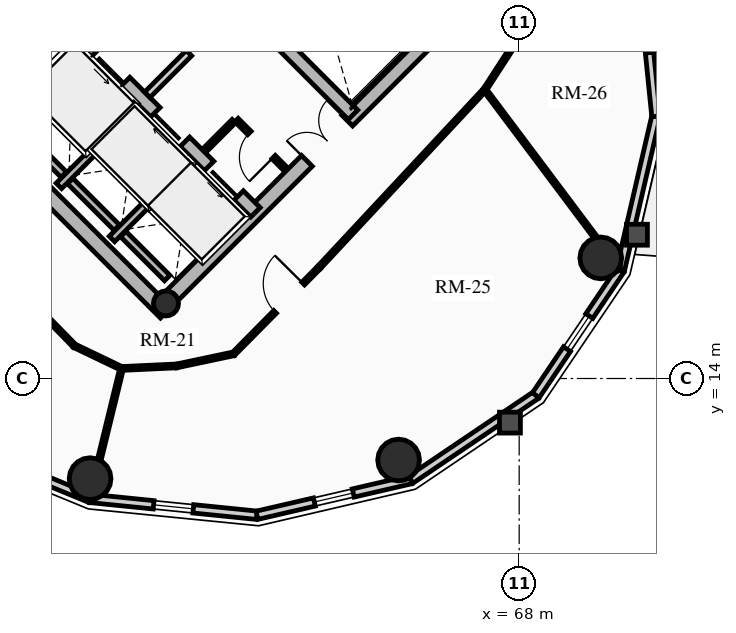
"""IFC4 building model, lengths in metres.
Left out: names, types, materials, properties, quantities, classifications, styles, units other than length and angle.
Written with IfcOpenShell. Run it as: python <this file> out.ifc"""

import sys

from ifc_helpers import new_model, si_unit, direction, frame, frame_2d, origin, origin_2d, place, context, subcontext, project, spatial, rectangle, circle, hollow_circle, extrude, source, transform, mapped, element, fill, save


model = new_model("IFC4")
c1 = context("Model", 3, precision=1e-05, world=origin(), true_north=direction((0.0, 1.0)))
c2 = subcontext(c1, "Body", "Model", "MODEL_VIEW")
j1 = project(units=[si_unit("LENGTHUNIT", "METRE"), si_unit("PLANEANGLEUNIT", "RADIAN")], contexts=[c1])
p1 = place(None, origin())
s1 = spatial("IfcSite", under=j1, at=p1, CompositionType="ELEMENT")
p2 = place(p1, origin())
s2 = spatial("IfcBuilding", under=s1, at=p2, CompositionType="ELEMENT")
p3 = place(p2, frame((0.0, 0.0, 199.57)))
s3 = spatial("IfcBuildingStorey", under=s2, at=p3, CompositionType="ELEMENT", Elevation=199.57)
p4 = place(p3, frame((58.702, 15.732, 0.0), z_axis=(0.0, 0.0, 1.0), x_axis=(-0.707106781187, 0.707106781187, 0.0)))
e1 = element("IfcWall", 1, at=p4, inside=s3, PredefinedType="SHEAR", context=c2, shape_type="SweptSolid", body=[
    extrude(rectangle(XDim=14.1, YDim=0.4, at=frame_2d((7.05, 0.0))), origin(), (0.0, 0.0, 1.0), 2.91),
])
p5 = place(p3, frame((58.561, 15.873, 0.0), z_axis=(0.0, 0.0, 1.0), x_axis=(0.707106781187, 0.707106781187, 0.0)))
e2 = element("IfcWall", 2, at=p5, inside=s3, PredefinedType="SHEAR", context=c2, shape_type="SweptSolid", body=[
    extrude(rectangle(XDim=10.7, YDim=0.4, at=frame_2d((5.35, 0.0))), origin(), (0.0, 0.0, 1.0), 2.91),
])
m1 = source(origin(), c2, "Body", "SweptSolid", [
    extrude(rectangle(XDim=1.5, YDim=2.02, at=frame_2d((0.75, 1.01))), frame((0.0, 0.21, 0.0), z_axis=(0.0, -1.0, 0.0), x_axis=(1.0, 0.0, 0.0)), (0.0, 0.0, 1.0), 0.42),
])
p6 = place(p5, frame((5.45, 0.0, 0.0)))
e3 = element("IfcOpeningElement", 3, at=p6, cuts=e2, PredefinedType="OPENING", context=c2, shape_type="MappedRepresentation", body=[
    mapped(m1, transform((0.0, 0.0, 0.0), x_axis=(1.0, 0.0, 0.0), y_axis=(0.0, 1.0, 0.0), z_axis=(0.0, 0.0, 1.0), scale=1.0)),
])
p7 = place(p3, frame((61.06, 18.373, 0.0), z_axis=(0.0, 0.0, 1.0), x_axis=(-0.707106781187, 0.707106781187, 0.0)))
e4 = element("IfcWall", 4, at=p7, inside=s3, PredefinedType="SHEAR", context=c2, shape_type="SweptSolid", body=[
    extrude(rectangle(XDim=13.7, YDim=0.35, at=frame_2d((6.85, 0.0))), origin(), (0.0, 0.0, 1.0), 2.91),
])
m2 = source(origin(), c2, "Body", "SweptSolid", [
    extrude(rectangle(XDim=1.1, YDim=2.015, at=frame_2d((0.55, 1.007))), frame((0.0, 0.185, 0.0), z_axis=(0.0, -1.0, 0.0), x_axis=(1.0, 0.0, 0.0)), (0.0, 0.0, 1.0), 0.37),
])
p8 = place(p7, frame((4.85, 0.0, 0.0)))
e5 = element("IfcOpeningElement", 5, at=p8, cuts=e4, PredefinedType="OPENING", context=c2, shape_type="MappedRepresentation", body=[
    mapped(m2, transform((0.0, 0.0, 0.0), x_axis=(1.0, 0.0, 0.0), y_axis=(0.0, 1.0, 0.0), z_axis=(0.0, 0.0, 1.0), scale=1.0)),
])
p9 = place(p7, frame((0.625, 0.0, 0.0)))
e6 = element("IfcOpeningElement", 6, at=p9, cuts=e4, PredefinedType="OPENING", context=c2, shape_type="MappedRepresentation", body=[
    mapped(m2, transform((0.0, 0.0, 0.0), x_axis=(1.0, 0.0, 0.0), y_axis=(0.0, 1.0, 0.0), z_axis=(0.0, 0.0, 1.0), scale=1.0)),
])
p10 = place(p7, frame((2.625, 0.0, 0.0)))
e7 = element("IfcOpeningElement", 7, at=p10, cuts=e4, PredefinedType="OPENING", context=c2, shape_type="MappedRepresentation", body=[
    mapped(m2, transform((0.0, 0.0, 0.0), x_axis=(1.0, 0.0, 0.0), y_axis=(0.0, 1.0, 0.0), z_axis=(0.0, 0.0, 1.0), scale=1.0)),
])
m3 = source(origin(), c2, "Body", "SweptSolid", [
    extrude(rectangle(XDim=1.15, YDim=2.02, at=frame_2d((0.575, 1.01))), frame((0.0, 0.185, 0.0), z_axis=(0.0, -1.0, 0.0), x_axis=(1.0, 0.0, 0.0)), (0.0, 0.0, 1.0), 0.37),
])
p11 = place(p7, frame((7.27, 0.0, 0.0)))
e8 = element("IfcOpeningElement", 8, at=p11, cuts=e4, PredefinedType="OPENING", context=c2, shape_type="MappedRepresentation", body=[
    mapped(m3, transform((0.0, 0.0, 0.0), x_axis=(1.0, 0.0, 0.0), y_axis=(0.0, 1.0, 0.0), z_axis=(0.0, 0.0, 1.0), scale=1.0)),
])
p12 = place(p3, frame((63.627, 20.94, 0.0), z_axis=(0.0, 0.0, 1.0), x_axis=(-0.707119496762, 0.707094065383, 0.0)))
e9 = element("IfcWall", 9, at=p12, inside=s3, PredefinedType="SHEAR", context=c2, shape_type="SweptSolid", body=[
    extrude(rectangle(XDim=9.6, YDim=0.35, at=frame_2d((4.8, 0.0))), origin(), (0.0, 0.0, 1.0), 2.91),
])
p13 = place(p12, frame((5.28, 0.0, 0.0)))
e10 = element("IfcOpeningElement", 10, at=p13, cuts=e9, PredefinedType="OPENING", context=c2, shape_type="MappedRepresentation", body=[
    mapped(m3, transform((0.0, 0.0, 0.0), x_axis=(1.0, 0.0, 0.0), y_axis=(0.0, 1.0, 0.0), z_axis=(0.0, 0.0, 1.0), scale=1.0)),
])
p14 = place(p3, frame((53.784, 21.003, 0.0), z_axis=(0.0, 0.0, 1.0), x_axis=(0.707106781187, 0.707106781187, 0.0)))
e11 = element("IfcWall", 11, at=p14, inside=s3, PredefinedType="SHEAR", context=c2, shape_type="SweptSolid", body=[
    extrude(rectangle(XDim=3.285, YDim=0.35, at=frame_2d((1.643, 0.0))), origin(), (0.0, 0.0, 1.0), 2.91),
])
p15 = place(p3, frame((58.706, 15.976, 0.0), z_axis=(0.0, 0.0, 1.0), x_axis=(0.707106781187, 0.707106781187, 0.0)))
e12 = element("IfcColumn", 12, at=p15, inside=s3, PredefinedType="COLUMN", context=c2, shape_type="SweptSolid", body=[
    extrude(hollow_circle(Radius=0.33, WallThickness=0.025, at=origin_2d()), origin(), (0.0, 0.0, 1.0), 2.91),
])
for number, where, z_axis, x_axis in (
    (13, (56.709, 11.365, 0.0), (0.0, 0.0, 1.0), (1.0, 0.0, 0.0)),
    (14, (64.827, 11.854, 0.0), (0.0, 0.0, 1.0), (1.0, 0.0, 0.0)),
    (15, (70.146, 17.173, 0.0), (0.0, 0.0, 1.0), (1.0, 0.0, 0.0)),
):
    element("IfcColumn", number, at=place(p3, frame(where, z_axis=z_axis, x_axis=x_axis)), inside=s3, PredefinedType="USERDEFINED", context=c2, shape_type="SweptSolid", body=[
        extrude(circle(Radius=0.55, at=origin_2d()), origin(), (0.0, 0.0, 1.0), 2.91),
    ])
p16 = place(p3, frame((56.705, 10.845, 0.0), z_axis=(0.0, 0.0, 1.0), x_axis=(-0.924447353237, 0.381309704956, 0.0)))
e16 = element("IfcWall", 16, at=p16, inside=s3, PredefinedType="SOLIDWALL", context=c2, shape_type="SweptSolid", body=[
    extrude(rectangle(XDim=4.671, YDim=0.22, at=frame_2d((2.335, 0.0))), origin(), (0.0, 0.0, 1.0), 2.322),
])
p17 = place(p3, frame((61.1, 10.401, 0.0), z_axis=(0.0, 0.0, 1.0), x_axis=(-0.994929930991, 0.100570534541, 0.0)))
e17 = element("IfcWall", 17, at=p17, inside=s3, PredefinedType="SOLIDWALL", context=c2, shape_type="SweptSolid", body=[
    extrude(rectangle(XDim=4.418, YDim=0.22, at=frame_2d((2.209, 0.0))), origin(), (0.0, 0.0, 1.0), 2.322),
])
m4 = source(origin(), c2, "Body", "SweptSolid", [
    extrude(rectangle(XDim=1.05, YDim=1.3, at=frame_2d((0.525, 0.65))), frame((0.0, 0.12, 0.0), z_axis=(0.0, -1.0, 0.0), x_axis=(1.0, 0.0, 0.0)), (0.0, 0.0, 1.0), 0.24),
])
p18 = place(p17, frame((1.684, 0.0, 0.65)))
e18 = element("IfcOpeningElement", 18, at=p18, cuts=e17, PredefinedType="OPENING", context=c2, shape_type="MappedRepresentation", body=[
    mapped(m4, transform((0.0, 0.0, 0.0), x_axis=(1.0, 0.0, 0.0), y_axis=(0.0, 1.0, 0.0), z_axis=(0.0, 0.0, 1.0), scale=1.0)),
])
p19 = place(p3, frame((65.144, 11.337, 0.0), z_axis=(0.0, 0.0, 1.0), x_axis=(-0.974249228678, -0.225473813158, 0.0)))
e19 = element("IfcWall", 19, at=p19, inside=s3, PredefinedType="SOLIDWALL", context=c2, shape_type="SweptSolid", body=[
    extrude(rectangle(XDim=4.15, YDim=0.22, at=frame_2d((2.075, 0.0))), origin(), (0.0, 0.0, 1.0), 2.322),
])
p20 = place(p19, frame((1.55, 0.0, 0.65)))
e20 = element("IfcOpeningElement", 20, at=p20, cuts=e19, PredefinedType="OPENING", context=c2, shape_type="MappedRepresentation", body=[
    mapped(m4, transform((0.0, 0.0, 0.0), x_axis=(1.0, 0.0, 0.0), y_axis=(0.0, 1.0, 0.0), z_axis=(0.0, 0.0, 1.0), scale=1.0)),
])
p21 = place(p3, frame((68.439, 13.561, 0.0), z_axis=(0.0, 0.0, 1.0), x_axis=(-0.828833723692, -0.559495003079, 0.0)))
e21 = element("IfcWall", 21, at=p21, inside=s3, PredefinedType="SOLIDWALL", context=c2, shape_type="SweptSolid", body=[
    extrude(rectangle(XDim=3.976, YDim=0.22, at=frame_2d((1.988, 0.0))), origin(), (0.0, 0.0, 1.0), 2.322),
])
p22 = place(p3, frame((70.663, 16.856, 0.0), z_axis=(0.0, 0.0, 1.0), x_axis=(-0.559495003079, -0.828833723692, 0.0)))
e22 = element("IfcWall", 22, at=p22, inside=s3, PredefinedType="SOLIDWALL", context=c2, shape_type="SweptSolid", body=[
    extrude(rectangle(XDim=3.976, YDim=0.22, at=frame_2d((1.988, 0.0))), origin(), (0.0, 0.0, 1.0), 2.322),
])
p23 = place(p22, frame((1.463, 0.0, 0.65)))
e23 = element("IfcOpeningElement", 23, at=p23, cuts=e22, PredefinedType="OPENING", context=c2, shape_type="MappedRepresentation", body=[
    mapped(m4, transform((0.0, 0.0, 0.0), x_axis=(1.0, 0.0, 0.0), y_axis=(0.0, 1.0, 0.0), z_axis=(0.0, 0.0, 1.0), scale=1.0)),
])
p24 = place(p3, frame((71.599, 20.9, 0.0), z_axis=(0.0, 0.0, 1.0), x_axis=(-0.225473813158, -0.974249228678, 0.0)))
e24 = element("IfcWall", 24, at=p24, inside=s3, PredefinedType="SOLIDWALL", context=c2, shape_type="SweptSolid", body=[
    extrude(rectangle(XDim=4.15, YDim=0.22, at=frame_2d((2.075, 0.0))), origin(), (0.0, 0.0, 1.0), 2.322),
])
p25 = place(p3, frame((71.155, 25.295, 0.0), z_axis=(0.0, 0.0, 1.0), x_axis=(0.100570534541, -0.994929930991, 0.0)))
e25 = element("IfcWall", 25, at=p25, inside=s3, PredefinedType="SOLIDWALL", context=c2, shape_type="SweptSolid", body=[
    extrude(rectangle(XDim=4.418, YDim=0.22, at=frame_2d((2.209, 0.0))), origin(), (0.0, 0.0, 1.0), 2.322),
])
p26 = place(p25, frame((1.684, 0.0, 0.65)))
e26 = element("IfcOpeningElement", 26, at=p26, cuts=e25, PredefinedType="OPENING", context=c2, shape_type="MappedRepresentation", body=[
    mapped(m4, transform((0.0, 0.0, 0.0), x_axis=(1.0, 0.0, 0.0), y_axis=(0.0, 1.0, 0.0), z_axis=(0.0, 0.0, 1.0), scale=1.0)),
])
p27 = place(p3, frame((55.888, 19.069, 0.0), z_axis=(0.0, 0.0, 1.0), x_axis=(0.707106781187, 0.707106781187, 0.0)))
e27 = element("IfcWall", 27, at=p27, inside=s3, PredefinedType="SHEAR", context=c2, shape_type="SweptSolid", body=[
    extrude(rectangle(XDim=2.97, YDim=0.2, at=frame_2d((1.485, 0.0))), origin(), (0.0, 0.0, 1.0), 2.91),
])
p28 = place(p3, frame((56.015, 19.366, 0.0), z_axis=(0.0, 0.0, 1.0), x_axis=(-0.707106781187, 0.707106781187, 0.0)))
e28 = element("IfcWall", 28, at=p28, inside=s3, PredefinedType="SHEAR", context=c2, shape_type="SweptSolid", body=[
    extrude(rectangle(XDim=2.44, YDim=0.2, at=frame_2d((1.22, 0.0))), origin(), (0.0, 0.0, 1.0), 2.91),
])
p29 = place(p3, frame((57.284, 17.673, 0.0), z_axis=(0.0, 0.0, 1.0), x_axis=(0.707147878904, 0.70706568108, 0.0)))
e29 = element("IfcWall", 29, at=p29, inside=s3, PredefinedType="SHEAR", context=c2, shape_type="SweptSolid", body=[
    extrude(rectangle(XDim=2.97, YDim=0.2, at=frame_2d((1.485, 0.0))), origin(), (0.0, 0.0, 1.0), 2.91),
])
p30 = place(p3, frame((57.412, 17.97, 0.0), z_axis=(0.0, 0.0, 1.0), x_axis=(-0.707106781187, 0.707106781187, 0.0)))
e30 = element("IfcWall", 30, at=p30, inside=s3, PredefinedType="SHEAR", context=c2, shape_type="SweptSolid", body=[
    extrude(rectangle(XDim=1.735, YDim=0.2, at=frame_2d((0.867, 0.0))), origin(), (0.0, 0.0, 1.0), 2.91),
])
p31 = place(p3, frame((58.737, 16.644, 0.0), z_axis=(0.0, 0.0, 1.0), x_axis=(-0.707032117043, 0.707181437447, 0.0)))
e31 = element("IfcWall", 31, at=p31, inside=s3, PredefinedType="SHEAR", context=c2, shape_type="SweptSolid", body=[
    extrude(rectangle(XDim=1.635, YDim=0.2, at=frame_2d((0.817, 0.0))), origin(), (0.0, 0.0, 1.0), 2.91),
])
p32 = place(p3, frame((58.214, 21.467, 0.0), z_axis=(0.0, 0.0, 1.0), x_axis=(0.707106781187, 0.707106781187, 0.0)))
e32 = element("IfcWall", 32, at=p32, inside=s3, PredefinedType="PARTITIONING", context=c2, shape_type="SweptSolid", body=[
    extrude(rectangle(XDim=3.28, YDim=0.2, at=frame_2d((1.64, 0.0))), origin(), (0.0, 0.0, 1.0), 2.685),
])
m5 = source(origin(), c2, "Body", "SweptSolid", [
    extrude(rectangle(XDim=1.5, YDim=2.02, at=frame_2d((0.75, 1.01))), frame((0.0, 0.11, 0.0), z_axis=(0.0, -1.0, 0.0), x_axis=(1.0, 0.0, 0.0)), (0.0, 0.0, 1.0), 0.22),
])
p33 = place(p32, frame((1.55, 0.0, 0.0)))
e33 = element("IfcOpeningElement", 33, at=p33, cuts=e32, PredefinedType="OPENING", context=c2, shape_type="MappedRepresentation", body=[
    mapped(m5, transform((0.0, 0.0, 0.0), x_axis=(1.0, 0.0, 0.0), y_axis=(0.0, 1.0, 0.0), z_axis=(0.0, 0.0, 1.0), scale=1.0)),
])
p34 = place(p3, frame((61.835, 19.529, 0.0), z_axis=(0.0, 0.0, 1.0), x_axis=(-0.707174592913, 0.707038962956, 0.0)))
e34 = element("IfcWall", 34, at=p34, inside=s3, PredefinedType="PARTITIONING", context=c2, shape_type="SweptSolid", body=[
    extrude(rectangle(XDim=1.8, YDim=0.125, at=frame_2d((0.9, 0.0))), origin(), (0.0, 0.0, 1.0), 2.685),
])
m6 = source(origin(), c2, "Body", "SweptSolid", [
    extrude(rectangle(XDim=0.9, YDim=2.005, at=frame_2d((0.45, 1.002))), frame((0.0, 0.073, 0.0), z_axis=(0.0, -1.0, 0.0), x_axis=(1.0, 0.0, 0.0)), (0.0, 0.0, 1.0), 0.145),
])
p35 = place(p34, frame((0.42, 0.0, 0.0)))
e35 = element("IfcOpeningElement", 35, at=p35, cuts=e34, PredefinedType="OPENING", context=c2, shape_type="MappedRepresentation", body=[
    mapped(m6, transform((0.0, 0.0, 0.0), x_axis=(1.0, 0.0, 0.0), y_axis=(0.0, 1.0, 0.0), z_axis=(0.0, 0.0, 1.0), scale=1.0)),
])
p36 = place(p3, frame((59.713, 19.996, 0.0), z_axis=(0.0, 0.0, 1.0), x_axis=(0.707217726, 0.706995818963, 0.0)))
e36 = element("IfcWall", 36, at=p36, inside=s3, PredefinedType="PARTITIONING", context=c2, shape_type="SweptSolid", body=[
    extrude(rectangle(XDim=1.1, YDim=0.125, at=frame_2d((0.55, 0.0))), origin(), (0.0, 0.0, 1.0), 2.685),
])
p37 = place(p3, frame((52.126, 19.126, 0.0), z_axis=(0.0, 0.0, 1.0), x_axis=(0.698979087027, -0.715142108884, 0.0)))
e37 = element("IfcWall", 37, at=p37, inside=s3, PredefinedType="MOVABLE", context=c2, shape_type="SweptSolid", body=[
    extrude(rectangle(XDim=5.966, YDim=0.1, at=frame_2d((2.983, 0.0))), origin(), (0.0, 0.0, 1.0), 2.322),
])
p38 = place(p3, frame((56.296, 14.859, 0.0), z_axis=(0.0, 0.0, 1.0), x_axis=(0.90178292445, -0.432189260823, 0.0)))
e38 = element("IfcWall", 38, at=p38, inside=s3, PredefinedType="MOVABLE", context=c2, shape_type="SweptSolid", body=[
    extrude(rectangle(XDim=1.377, YDim=0.1, at=frame_2d((0.688, 0.0))), origin(), (0.0, 0.0, 1.0), 2.255),
])
p39 = place(p3, frame((57.538, 14.264, 0.0), z_axis=(0.0, 0.0, 1.0), x_axis=(0.99892990172, 0.046249880546, 0.0)))
e39 = element("IfcWall", 39, at=p39, inside=s3, PredefinedType="MOVABLE", context=c2, shape_type="SweptSolid", body=[
    extrude(rectangle(XDim=1.446, YDim=0.1, at=frame_2d((0.723, 0.0))), origin(), (0.0, 0.0, 1.0), 2.322),
])
p40 = place(p3, frame((58.983, 14.331, 0.0), z_axis=(0.0, 0.0, 1.0), x_axis=(0.978328007546, 0.207061125397, 0.0)))
e40 = element("IfcWall", 40, at=p40, inside=s3, PredefinedType="MOVABLE", context=c2, shape_type="SweptSolid", body=[
    extrude(rectangle(XDim=1.534, YDim=0.1, at=frame_2d((0.767, 0.0))), origin(), (0.0, 0.0, 1.0), 2.255),
])
p41 = place(p3, frame((60.484, 14.648, 0.0), z_axis=(0.0, 0.0, 1.0), x_axis=(0.703398221944, 0.710795991383, 0.0)))
e41 = element("IfcWall", 41, at=p41, inside=s3, PredefinedType="MOVABLE", context=c2, shape_type="SweptSolid", body=[
    extrude(rectangle(XDim=3.201, YDim=0.1, at=frame_2d((1.601, 0.0))), origin(), (0.0, 0.0, 1.0), 2.322),
])
m7 = source(origin(), c2, "Body", "SweptSolid", [
    extrude(rectangle(XDim=1.05, YDim=2.015, at=frame_2d((0.525, 1.007))), frame((0.0, 0.06, 0.0), z_axis=(0.0, -1.0, 0.0), x_axis=(1.0, 0.0, 0.0)), (0.0, 0.0, 1.0), 0.12),
])
p42 = place(p41, frame((1.553, 0.0, 0.0)))
e42 = element("IfcOpeningElement", 42, at=p42, cuts=e41, PredefinedType="OPENING", context=c2, shape_type="MappedRepresentation", body=[
    mapped(m7, transform((0.0, 0.0, 0.0), x_axis=(1.0, 0.0, 0.0), y_axis=(0.0, 1.0, 0.0), z_axis=(0.0, 0.0, 1.0), scale=1.0)),
])
p43 = place(p3, frame((62.736, 16.924, 0.0), z_axis=(0.0, 0.0, 1.0), x_axis=(0.681946700833, 0.731401871219, 0.0)))
e43 = element("IfcWall", 43, at=p43, inside=s3, PredefinedType="MOVABLE", context=c2, shape_type="SweptSolid", body=[
    extrude(rectangle(XDim=6.393, YDim=0.1, at=frame_2d((3.196, 0.0))), origin(), (0.0, 0.0, 1.0), 2.255),
])
p44 = place(p3, frame((67.095, 21.6, 0.0), z_axis=(0.0, 0.0, 1.0), x_axis=(0.543773190184, 0.839232219137, 0.0)))
e44 = element("IfcWall", 44, at=p44, inside=s3, PredefinedType="MOVABLE", context=c2, shape_type="SweptSolid", body=[
    extrude(rectangle(XDim=1.823, YDim=0.1, at=frame_2d((0.911, 0.0))), origin(), (0.0, 0.0, 1.0), 2.255),
])
p45 = place(p3, frame((57.538, 14.264, 0.0), z_axis=(0.0, 0.0, 1.0), x_axis=(-0.237377006249, -0.971417601706, 0.0)))
e45 = element("IfcWall", 45, at=p45, inside=s3, PredefinedType="MOVABLE", context=c2, shape_type="SweptSolid", body=[
    extrude(rectangle(XDim=3.499, YDim=0.1, at=frame_2d((1.75, 0.0))), origin(), (0.0, 0.0, 1.0), 2.322),
])
p46 = place(p3, frame((67.095, 21.6, 0.0), z_axis=(0.0, 0.0, 1.0), x_axis=(0.599947190798, -0.800039604178, 0.0)))
e46 = element("IfcWall", 46, at=p46, inside=s3, PredefinedType="MOVABLE", context=c2, shape_type="SweptSolid", body=[
    extrude(rectangle(XDim=5.918, YDim=0.1, at=frame_2d((2.959, 0.0))), origin(), (0.0, 0.0, 1.0), 2.322),
])
m8 = source(origin(), c2, "Body", "SweptSolid", [
    extrude(rectangle(XDim=1.05, YDim=1.3, at=frame_2d((0.525, 0.65))), frame((0.0, 0.03, 0.0), z_axis=(0.0, -1.0, 0.0), x_axis=(1.0, 0.0, 0.0)), (0.0, 0.0, 1.0), 0.06),
])
p47 = place(p18, origin())
e47 = element("IfcWindow", 47, at=p47, inside=s3, PartitioningType="SINGLE_PANEL", PredefinedType="WINDOW", context=c2, shape_type="MappedRepresentation", body=[
    mapped(m8, transform((0.0, 0.0, 0.0), x_axis=(1.0, 0.0, 0.0), y_axis=(0.0, 1.0, 0.0), z_axis=(0.0, 0.0, 1.0), scale=1.0)),
])
fill(e18, e47)
p48 = place(p20, origin())
e48 = element("IfcWindow", 48, at=p48, inside=s3, PartitioningType="SINGLE_PANEL", PredefinedType="WINDOW", context=c2, shape_type="MappedRepresentation", body=[
    mapped(m8, transform((0.0, 0.0, 0.0), x_axis=(1.0, 0.0, 0.0), y_axis=(0.0, 1.0, 0.0), z_axis=(0.0, 0.0, 1.0), scale=1.0)),
])
fill(e20, e48)
p49 = place(p23, origin())
e49 = element("IfcWindow", 49, at=p49, inside=s3, PartitioningType="SINGLE_PANEL", PredefinedType="WINDOW", context=c2, shape_type="MappedRepresentation", body=[
    mapped(m8, transform((0.0, 0.0, 0.0), x_axis=(1.0, 0.0, 0.0), y_axis=(0.0, 1.0, 0.0), z_axis=(0.0, 0.0, 1.0), scale=1.0)),
])
fill(e23, e49)
p50 = place(p26, origin())
e50 = element("IfcWindow", 50, at=p50, inside=s3, PartitioningType="SINGLE_PANEL", PredefinedType="WINDOW", context=c2, shape_type="MappedRepresentation", body=[
    mapped(m8, transform((0.0, 0.0, 0.0), x_axis=(1.0, 0.0, 0.0), y_axis=(0.0, 1.0, 0.0), z_axis=(0.0, 0.0, 1.0), scale=1.0)),
])
fill(e26, e50)
m9 = source(origin(), c2, "Body", "SweptSolid", [
    extrude(rectangle(XDim=1.1, YDim=2.015, at=frame_2d((0.55, 1.007))), frame((0.0, 0.025, 0.0), z_axis=(0.0, -1.0, 0.0), x_axis=(1.0, 0.0, 0.0)), (0.0, 0.0, 1.0), 0.05),
])
p51 = place(p8, origin())
e51 = element("IfcDoor", 51, at=p51, inside=s3, OperationType="SLIDING_TO_LEFT", PredefinedType="DOOR", context=c2, shape_type="MappedRepresentation", body=[
    mapped(m9, transform((0.0, 0.0, 0.0), x_axis=(1.0, 0.0, 0.0), y_axis=(0.0, 1.0, 0.0), z_axis=(0.0, 0.0, 1.0), scale=1.0)),
])
fill(e5, e51)
p52 = place(p9, origin())
e52 = element("IfcDoor", 52, at=p52, inside=s3, OperationType="SLIDING_TO_LEFT", PredefinedType="DOOR", context=c2, shape_type="MappedRepresentation", body=[
    mapped(m9, transform((0.0, 0.0, 0.0), x_axis=(1.0, 0.0, 0.0), y_axis=(0.0, 1.0, 0.0), z_axis=(0.0, 0.0, 1.0), scale=1.0)),
])
fill(e6, e52)
p53 = place(p10, origin())
e53 = element("IfcDoor", 53, at=p53, inside=s3, OperationType="SLIDING_TO_RIGHT", PredefinedType="DOOR", context=c2, shape_type="MappedRepresentation", body=[
    mapped(m9, transform((0.0, 0.0, 0.0), x_axis=(1.0, 0.0, 0.0), y_axis=(0.0, 1.0, 0.0), z_axis=(0.0, 0.0, 1.0), scale=1.0)),
])
fill(e7, e53)
m10 = source(origin(), c2, "Body", "SweptSolid", [
    extrude(rectangle(XDim=1.5, YDim=2.02, at=frame_2d((0.75, 1.01))), frame((0.0, 0.025, 0.0), z_axis=(0.0, -1.0, 0.0), x_axis=(1.0, 0.0, 0.0)), (0.0, 0.0, 1.0), 0.05),
])
p54 = place(p6, origin())
e54 = element("IfcDoor", 54, at=p54, inside=s3, OperationType="DOUBLE_DOOR_SINGLE_SWING", PredefinedType="DOOR", context=c2, shape_type="MappedRepresentation", body=[
    mapped(m10, transform((0.0, 0.0, 0.0), x_axis=(1.0, 0.0, 0.0), y_axis=(0.0, 1.0, 0.0), z_axis=(0.0, 0.0, 1.0), scale=1.0)),
])
fill(e3, e54)
p55 = place(p33, origin())
e55 = element("IfcDoor", 55, at=p55, inside=s3, OperationType="DOUBLE_DOOR_SINGLE_SWING", PredefinedType="DOOR", context=c2, shape_type="MappedRepresentation", body=[
    mapped(m10, transform((0.0, 0.0, 0.0), x_axis=(1.0, 0.0, 0.0), y_axis=(0.0, 1.0, 0.0), z_axis=(0.0, 0.0, 1.0), scale=1.0)),
])
fill(e33, e55)
m11 = source(origin(), c2, "Body", "SweptSolid", [
    extrude(rectangle(XDim=0.9, YDim=2.005, at=frame_2d((0.45, 1.002))), frame((0.0, 0.025, 0.0), z_axis=(0.0, -1.0, 0.0), x_axis=(1.0, 0.0, 0.0)), (0.0, 0.0, 1.0), 0.05),
])
p56 = place(p35, origin())
e56 = element("IfcDoor", 56, at=p56, inside=s3, OperationType="SINGLE_SWING_LEFT", PredefinedType="DOOR", context=c2, shape_type="MappedRepresentation", body=[
    mapped(m11, transform((0.0, 0.0, 0.0), x_axis=(1.0, 0.0, 0.0), y_axis=(0.0, 1.0, 0.0), z_axis=(0.0, 0.0, 1.0), scale=1.0)),
])
fill(e35, e56)
m12 = source(origin(), c2, "Body", "SweptSolid", [
    extrude(rectangle(XDim=1.05, YDim=2.015, at=frame_2d((0.525, 1.007))), frame((0.0, 0.025, 0.0), z_axis=(0.0, -1.0, 0.0), x_axis=(1.0, 0.0, 0.0)), (0.0, 0.0, 1.0), 0.05),
])
p57 = place(p42, origin())
e57 = element("IfcDoor", 57, at=p57, inside=s3, OperationType="SINGLE_SWING_RIGHT", PredefinedType="DOOR", context=c2, shape_type="MappedRepresentation", body=[
    mapped(m12, transform((0.0, 0.0, 0.0), x_axis=(1.0, 0.0, 0.0), y_axis=(0.0, 1.0, 0.0), z_axis=(0.0, 0.0, 1.0), scale=1.0)),
])
fill(e42, e57)
save(model, sys.argv[1])
